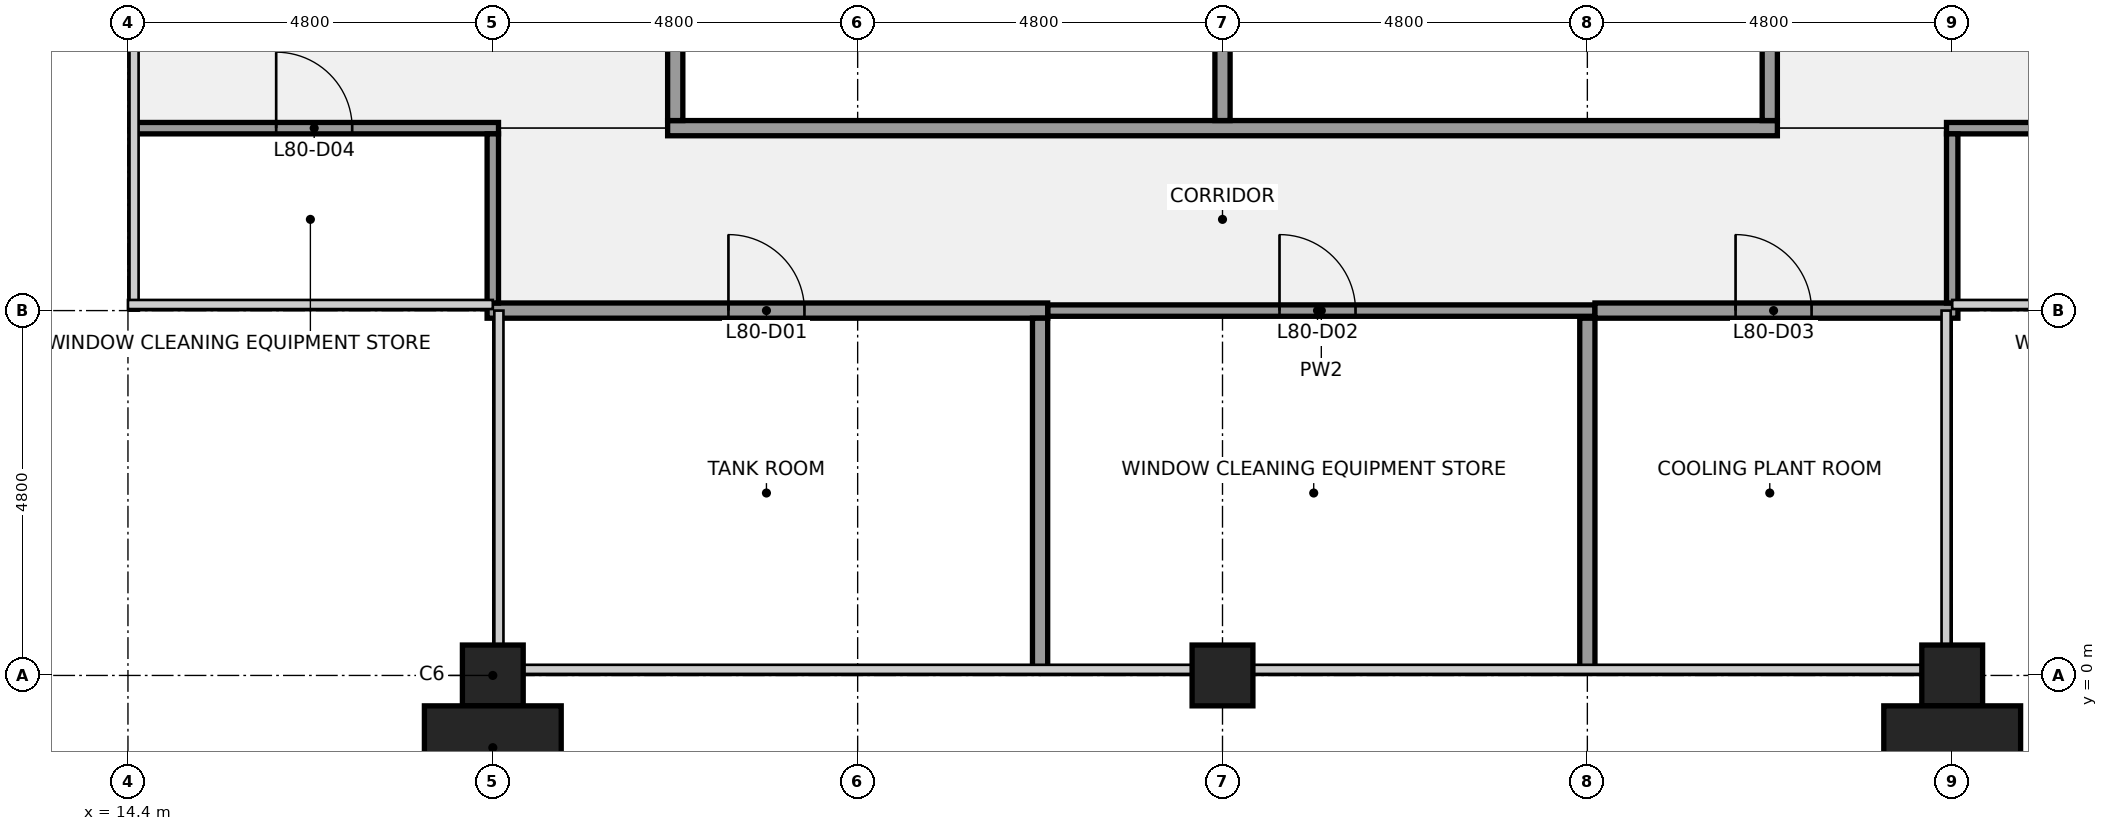
"""IFC4 building model, lengths in metres.
Left out: names, types, materials, properties, quantities, classifications, styles, units other than length and angle.
Written with IfcOpenShell. Run it as: python <this file> out.ifc"""

import sys

from ifc_helpers import new_model, si_unit, direction, frame, frame_2d, origin, origin_2d, place, context, subcontext, project, spatial, rectangle, extrude, element, fill, save


model = new_model("IFC4")
c1 = context("Model", 3, precision=1e-05, world=origin(), true_north=direction((0.0, 1.0)))
c2 = subcontext(c1, "Body", "Model", "MODEL_VIEW")
j1 = project(units=[si_unit("LENGTHUNIT", "METRE"), si_unit("PLANEANGLEUNIT", "RADIAN")], contexts=[c1])
p1 = place(None, origin())
s1 = spatial("IfcSite", under=j1, at=p1, CompositionType="ELEMENT")
p2 = place(p1, origin())
s2 = spatial("IfcBuilding", under=s1, at=p2, CompositionType="ELEMENT")
p3 = place(p2, frame((0.0, 0.0, 358.3)))
s3 = spatial("IfcBuildingStorey", under=s2, at=p3, CompositionType="ELEMENT", Elevation=358.3)
for number, where, z_axis, x_axis in (
    (1, (19.2, 0.0, 0.0), (0.0, 0.0, 1.0), (1.0, 0.0, 0.0)),
    (2, (28.8, 0.0, 0.0), (0.0, 0.0, 1.0), (1.0, 0.0, 0.0)),
    (3, (38.4, 0.0, 0.0), (0.0, 0.0, 1.0), (1.0, 0.0, 0.0)),
):
    element("IfcColumn", number, at=place(p3, frame(where, z_axis=z_axis, x_axis=x_axis)), inside=s3, PredefinedType="COLUMN", context=c2, shape_type="SweptSolid", body=[
        extrude(rectangle(XDim=0.8, YDim=0.8, at=origin_2d()), origin(), (0.0, 0.0, 1.0), 3.942),
    ])
p4 = place(p3, frame((26.5, 4.8, 0.0), z_axis=(0.0, 0.0, 1.0), x_axis=(1.0, 0.0, 0.0)))
e4 = element("IfcWall", 4, at=p4, inside=s3, PredefinedType="PARTITIONING", context=c2, shape_type="SweptSolid", body=[
    extrude(rectangle(XDim=7.2, YDim=0.15, at=frame_2d((3.6, 0.0))), origin(), (0.0, 0.0, 1.0), 2.759),
])
p5 = place(p4, frame((3.05, 0.0, 0.0)))
e5 = element("IfcOpeningElement", 5, at=p5, cuts=e4, PredefinedType="OPENING", context=c2, shape_type="SweptSolid", body=[
    extrude(rectangle(XDim=1.0, YDim=2.1, at=frame_2d((0.5, 1.05))), frame((0.0, 0.085, 0.0), z_axis=(0.0, -1.0, 0.0), x_axis=(1.0, 0.0, 0.0)), (0.0, 0.0, 1.0), 0.17),
])
p6 = place(p3, frame((19.125, 4.8, 0.0), z_axis=(0.0, 0.0, 1.0), x_axis=(1.0, 0.0, 0.0)))
e6 = element("IfcWall", 6, at=p6, inside=s3, PredefinedType="PARTITIONING", context=c2, shape_type="SweptSolid", body=[
    extrude(rectangle(XDim=7.375, YDim=0.2, at=frame_2d((3.688, 0.0))), origin(), (0.0, 0.0, 1.0), 2.759),
])
p7 = place(p6, frame((3.175, 0.0, 0.0)))
e7 = element("IfcOpeningElement", 7, at=p7, cuts=e6, PredefinedType="OPENING", context=c2, shape_type="SweptSolid", body=[
    extrude(rectangle(XDim=1.0, YDim=2.1, at=frame_2d((0.5, 1.05))), frame((0.0, 0.11, 0.0), z_axis=(0.0, -1.0, 0.0), x_axis=(1.0, 0.0, 0.0)), (0.0, 0.0, 1.0), 0.22),
])
p8 = place(p3, frame((33.7, 4.8, 0.0), z_axis=(0.0, 0.0, 1.0), x_axis=(1.0, 0.0, 0.0)))
e8 = element("IfcWall", 8, at=p8, inside=s3, PredefinedType="PARTITIONING", context=c2, shape_type="SweptSolid", body=[
    extrude(rectangle(XDim=4.775, YDim=0.2, at=frame_2d((2.388, 0.0))), origin(), (0.0, 0.0, 1.0), 2.759),
])
p9 = place(p8, frame((1.85, 0.0, 0.0)))
e9 = element("IfcOpeningElement", 9, at=p9, cuts=e8, PredefinedType="OPENING", context=c2, shape_type="SweptSolid", body=[
    extrude(rectangle(XDim=1.0, YDim=2.1, at=frame_2d((0.5, 1.05))), frame((0.0, 0.11, 0.0), z_axis=(0.0, -1.0, 0.0), x_axis=(1.0, 0.0, 0.0)), (0.0, 0.0, 1.0), 0.22),
])
p10 = place(p3, frame((14.5, 7.2, 0.0), z_axis=(0.0, 0.0, 1.0), x_axis=(1.0, 0.0, 0.0)))
e10 = element("IfcWall", 10, at=p10, inside=s3, PredefinedType="PARTITIONING", context=c2, shape_type="SweptSolid", body=[
    extrude(rectangle(XDim=4.775, YDim=0.15, at=frame_2d((2.387, 0.0))), origin(), (0.0, 0.0, 1.0), 2.759),
])
p11 = place(p10, frame((1.85, 0.0, 0.0)))
e11 = element("IfcOpeningElement", 11, at=p11, cuts=e10, PredefinedType="OPENING", context=c2, shape_type="SweptSolid", body=[
    extrude(rectangle(XDim=1.0, YDim=2.1, at=frame_2d((0.5, 1.05))), frame((0.0, 0.085, 0.0), z_axis=(0.0, -1.0, 0.0), x_axis=(1.0, 0.0, 0.0)), (0.0, 0.0, 1.0), 0.17),
])
p12 = place(p3, frame((38.325, 7.2, 0.0), z_axis=(0.0, 0.0, 1.0), x_axis=(1.0, 0.0, 0.0)))
e12 = element("IfcWall", 12, at=p12, inside=s3, PredefinedType="PARTITIONING", context=c2, shape_type="SweptSolid", body=[
    extrude(rectangle(XDim=4.775, YDim=0.15, at=frame_2d((2.388, 0.0))), origin(), (0.0, 0.0, 1.0), 2.759),
])
p13 = place(p12, frame((1.925, 0.0, 0.0)))
e13 = element("IfcOpeningElement", 13, at=p13, cuts=e12, PredefinedType="OPENING", context=c2, shape_type="SweptSolid", body=[
    extrude(rectangle(XDim=1.0, YDim=2.1, at=frame_2d((0.5, 1.05))), frame((0.0, 0.085, 0.0), z_axis=(0.0, -1.0, 0.0), x_axis=(1.0, 0.0, 0.0)), (0.0, 0.0, 1.0), 0.17),
])
p14 = place(p3, frame((21.5, 7.2, 0.0), z_axis=(0.0, 0.0, 1.0), x_axis=(1.0, 0.0, 0.0)))
e14 = element("IfcWall", 14, at=p14, inside=s3, PredefinedType="PARTITIONING", context=c2, shape_type="SweptSolid", body=[
    extrude(rectangle(XDim=14.6, YDim=0.2, at=frame_2d((7.3, 0.0))), origin(), (0.0, 0.0, 1.0), 2.759),
])
p15 = place(p3, frame((19.2, 4.9, 0.0), z_axis=(0.0, 0.0, 1.0), x_axis=(0.0, 1.0, 0.0)))
e15 = element("IfcWall", 15, at=p15, inside=s3, PredefinedType="PARTITIONING", context=c2, shape_type="SweptSolid", body=[
    extrude(rectangle(XDim=2.225, YDim=0.15, at=frame_2d((1.113, 0.0))), origin(), (0.0, 0.0, 1.0), 2.759),
])
p16 = place(p3, frame((21.6, 7.3, 0.0), z_axis=(0.0, 0.0, 1.0), x_axis=(0.0, 1.0, 0.0)))
e16 = element("IfcWall", 16, at=p16, inside=s3, PredefinedType="PARTITIONING", context=c2, shape_type="SweptSolid", body=[
    extrude(rectangle(XDim=7.0, YDim=0.2, at=frame_2d((3.5, 0.0))), origin(), (0.0, 0.0, 1.0), 2.759),
])
p17 = place(p16, frame((3.0, 0.0, 0.0)))
e17 = element("IfcOpeningElement", 17, at=p17, cuts=e16, PredefinedType="OPENING", context=c2, shape_type="SweptSolid", body=[
    extrude(rectangle(XDim=1.0, YDim=2.1, at=frame_2d((0.5, 1.05))), frame((0.0, 0.11, 0.0), z_axis=(0.0, -1.0, 0.0), x_axis=(1.0, 0.0, 0.0)), (0.0, 0.0, 1.0), 0.22),
])
p18 = place(p3, frame((26.4, 0.1, 0.0), z_axis=(0.0, 0.0, 1.0), x_axis=(0.0, 1.0, 0.0)))
e18 = element("IfcWall", 18, at=p18, inside=s3, PredefinedType="PARTITIONING", context=c2, shape_type="SweptSolid", body=[
    extrude(rectangle(XDim=4.6, YDim=0.2, at=frame_2d((2.3, 0.0))), origin(), (0.0, 0.0, 1.0), 2.759),
])
p19 = place(p3, frame((28.8, 7.3, 0.0), z_axis=(0.0, 0.0, 1.0), x_axis=(0.0, 1.0, 0.0)))
e19 = element("IfcWall", 19, at=p19, inside=s3, PredefinedType="PARTITIONING", context=c2, shape_type="SweptSolid", body=[
    extrude(rectangle(XDim=7.0, YDim=0.2, at=frame_2d((3.5, 0.0))), origin(), (0.0, 0.0, 1.0), 2.759),
])
p20 = place(p3, frame((33.6, 0.1, 0.0), z_axis=(0.0, 0.0, 1.0), x_axis=(0.0, 1.0, 0.0)))
e20 = element("IfcWall", 20, at=p20, inside=s3, PredefinedType="PARTITIONING", context=c2, shape_type="SweptSolid", body=[
    extrude(rectangle(XDim=4.6, YDim=0.2, at=frame_2d((2.3, 0.0))), origin(), (0.0, 0.0, 1.0), 2.759),
])
p21 = place(p3, frame((36.0, 7.3, 0.0), z_axis=(0.0, 0.0, 1.0), x_axis=(0.0, 1.0, 0.0)))
e21 = element("IfcWall", 21, at=p21, inside=s3, PredefinedType="PARTITIONING", context=c2, shape_type="SweptSolid", body=[
    extrude(rectangle(XDim=7.0, YDim=0.2, at=frame_2d((3.5, 0.0))), origin(), (0.0, 0.0, 1.0), 2.759),
])
p22 = place(p21, frame((3.0, 0.0, 0.0)))
e22 = element("IfcOpeningElement", 22, at=p22, cuts=e21, PredefinedType="OPENING", context=c2, shape_type="SweptSolid", body=[
    extrude(rectangle(XDim=1.0, YDim=2.1, at=frame_2d((0.5, 1.05))), frame((0.0, 0.11, 0.0), z_axis=(0.0, -1.0, 0.0), x_axis=(1.0, 0.0, 0.0)), (0.0, 0.0, 1.0), 0.22),
])
p23 = place(p3, frame((38.4, 4.9, 0.0), z_axis=(0.0, 0.0, 1.0), x_axis=(0.0, 1.0, 0.0)))
e23 = element("IfcWall", 23, at=p23, inside=s3, PredefinedType="PARTITIONING", context=c2, shape_type="SweptSolid", body=[
    extrude(rectangle(XDim=2.225, YDim=0.15, at=frame_2d((1.113, 0.0))), origin(), (0.0, 0.0, 1.0), 2.759),
])
for number, where, z_axis, x_axis in (
    (24, (19.2, -0.95, 0.0), (0.0, 0.0, 1.0), (1.0, 0.0, 0.0)),
    (25, (38.4, -0.95, 0.0), (0.0, 0.0, 1.0), (1.0, 0.0, 0.0)),
):
    element("IfcColumn", number, at=place(p3, frame(where, z_axis=z_axis, x_axis=x_axis)), inside=s3, PredefinedType="PILASTER", context=c2, shape_type="SweptSolid", body=[
        extrude(rectangle(XDim=1.8, YDim=1.1, at=origin_2d()), origin(), (0.0, 0.0, 1.0), 4.0),
    ])
p24 = place(p7, origin())
e26 = element("IfcDoor", 26, at=p24, inside=s3, OperationType="SINGLE_SWING_LEFT", PredefinedType="DOOR", context=c2, shape_type="SweptSolid", body=[
    extrude(rectangle(XDim=1.0, YDim=2.1, at=frame_2d((0.5, 1.05))), frame((0.0, 0.025, 0.0), z_axis=(0.0, -1.0, 0.0), x_axis=(1.0, 0.0, 0.0)), (0.0, 0.0, 1.0), 0.05),
])
fill(e7, e26)
p25 = place(p5, origin())
e27 = element("IfcDoor", 27, at=p25, inside=s3, OperationType="SINGLE_SWING_LEFT", PredefinedType="DOOR", context=c2, shape_type="SweptSolid", body=[
    extrude(rectangle(XDim=1.0, YDim=2.1, at=frame_2d((0.5, 1.05))), frame((0.0, 0.025, 0.0), z_axis=(0.0, -1.0, 0.0), x_axis=(1.0, 0.0, 0.0)), (0.0, 0.0, 1.0), 0.05),
])
fill(e5, e27)
p26 = place(p9, origin())
e28 = element("IfcDoor", 28, at=p26, inside=s3, OperationType="SINGLE_SWING_LEFT", PredefinedType="DOOR", context=c2, shape_type="SweptSolid", body=[
    extrude(rectangle(XDim=1.0, YDim=2.1, at=frame_2d((0.5, 1.05))), frame((0.0, 0.025, 0.0), z_axis=(0.0, -1.0, 0.0), x_axis=(1.0, 0.0, 0.0)), (0.0, 0.0, 1.0), 0.05),
])
fill(e9, e28)
p27 = place(p11, origin())
e29 = element("IfcDoor", 29, at=p27, inside=s3, OperationType="SINGLE_SWING_LEFT", PredefinedType="DOOR", context=c2, shape_type="SweptSolid", body=[
    extrude(rectangle(XDim=1.0, YDim=2.1, at=frame_2d((0.5, 1.05))), frame((0.0, 0.025, 0.0), z_axis=(0.0, -1.0, 0.0), x_axis=(1.0, 0.0, 0.0)), (0.0, 0.0, 1.0), 0.05),
])
fill(e11, e29)
save(model, sys.argv[1])
